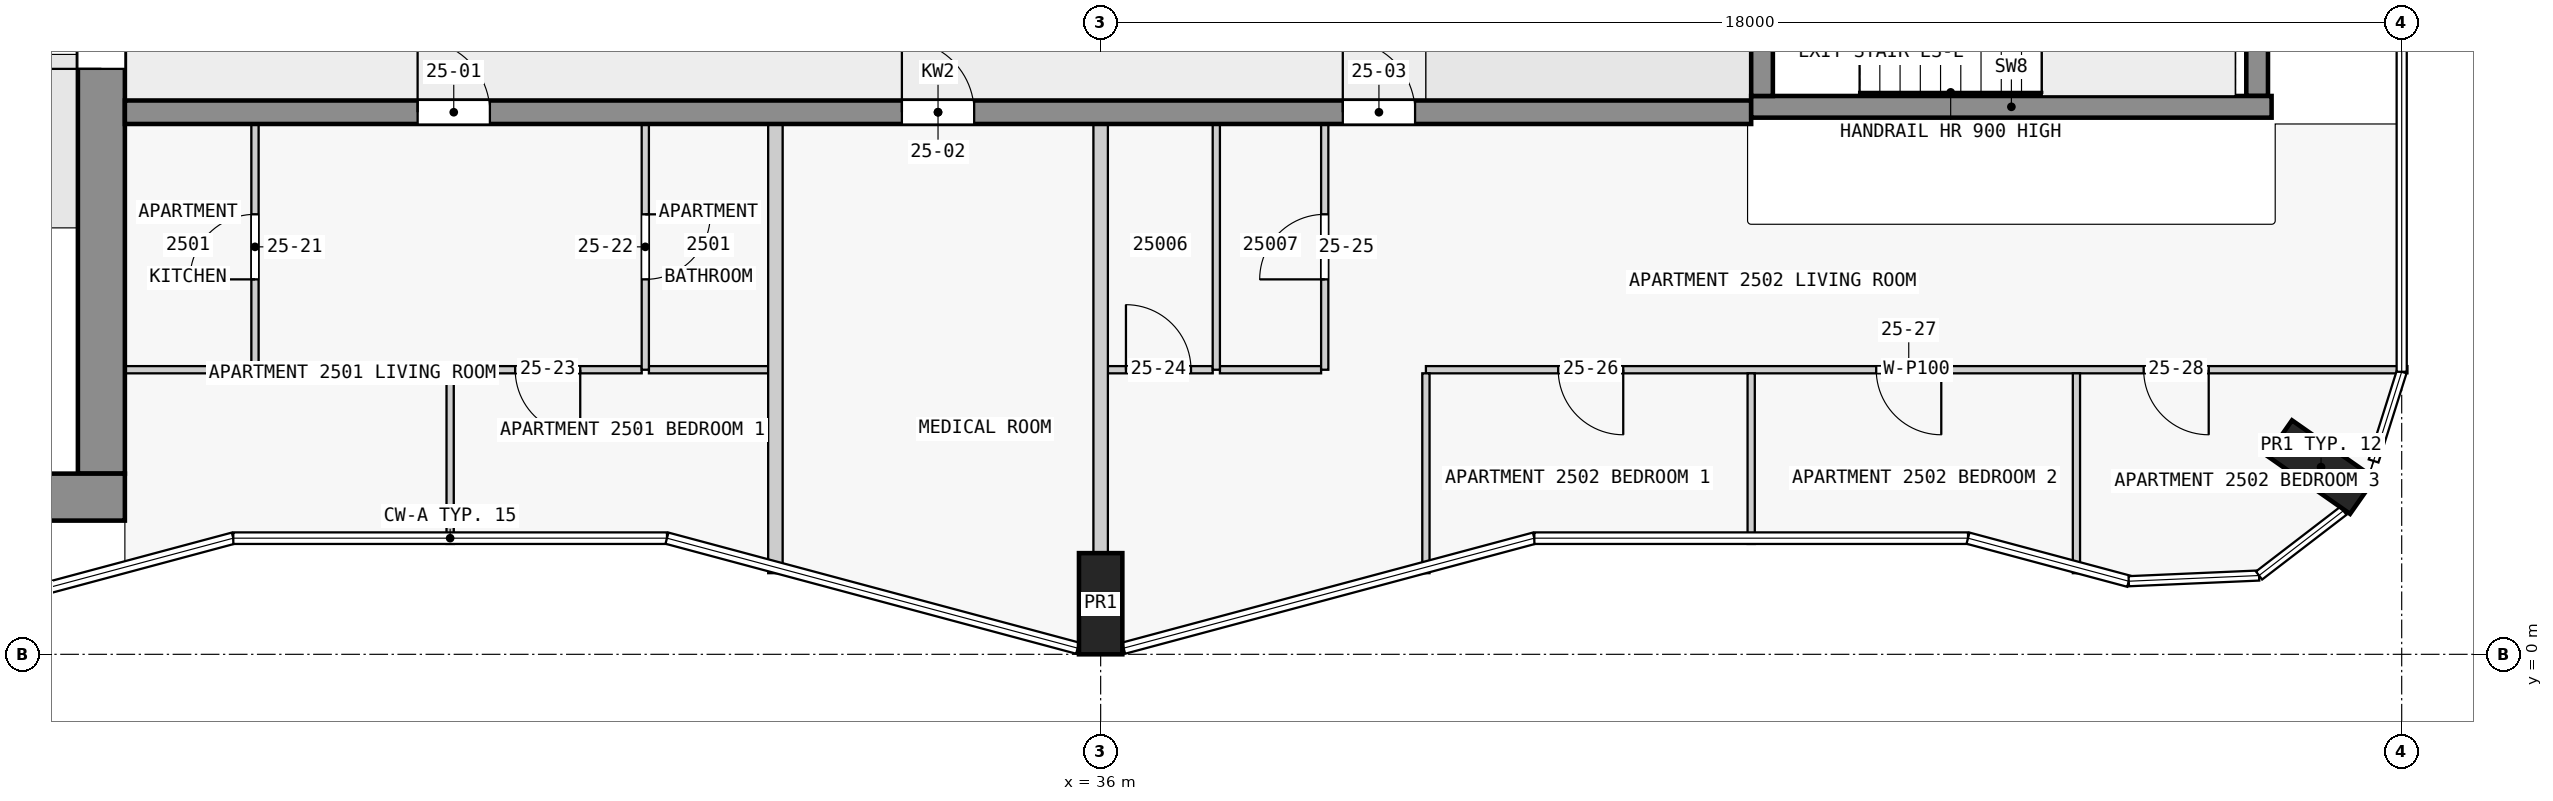
"""IFC4 building model, lengths in metres.
Left out: names, types, materials, properties, quantities, classifications, styles, units other than length and angle.
Written with IfcOpenShell. Run it as: python <this file> out.ifc"""

import sys

from ifc_helpers import new_model, si_unit, direction, frame, frame_2d, origin, origin_2d, place, context, subcontext, project, spatial, rectangle, extrude, element, fill, save


model = new_model("IFC4")
c1 = context("Model", 3, precision=1e-05, world=origin(), true_north=direction((0.0, 1.0)))
c2 = subcontext(c1, "Body", "Model", "MODEL_VIEW")
j1 = project(units=[si_unit("LENGTHUNIT", "METRE"), si_unit("PLANEANGLEUNIT", "RADIAN")], contexts=[c1])
p1 = place(None, origin())
s1 = spatial("IfcSite", under=j1, at=p1, CompositionType="ELEMENT")
p2 = place(p1, origin())
s2 = spatial("IfcBuilding", under=s1, at=p2, CompositionType="ELEMENT")
p3 = place(p2, frame((0.0, 0.0, 99.3)))
s3 = spatial("IfcBuildingStorey", under=s2, at=p3, CompositionType="ELEMENT", Elevation=99.3)
for number, where, z_axis, x_axis in (
    (1, (36.0, 0.7, 0.0), (0.0, 0.0, 1.0), (1.0, 0.0, 0.0)),
    (2, (52.884, 2.59, 0.0), (0.0, 0.0, 1.0), (0.574, 0.819, 0.0)),
):
    element("IfcColumn", number, at=place(p3, frame(where, z_axis=z_axis, x_axis=x_axis)), inside=s3, PredefinedType="COLUMN", context=c2, shape_type="SweptSolid", body=[
        extrude(rectangle(XDim=0.6, YDim=1.4, at=origin_2d()), origin(), (0.0, 0.0, 1.0), 3.5),
    ])
p4 = place(p3, frame((1.65, 2.175, 0.0), z_axis=(0.0, 0.0, 1.0), x_axis=(1.0, 0.0, 0.0)))
e3 = element("IfcWall", 3, at=p4, inside=s3, PredefinedType="SHEAR", context=c2, shape_type="SweptSolid", body=[
    extrude(rectangle(XDim=20.85, YDim=0.65, at=frame_2d((10.425, 0.0))), origin(), (0.0, 0.0, 1.0), 3.25),
])
p5 = place(p3, frame((22.175, 2.5, 0.0), z_axis=(0.0, 0.0, 1.0), x_axis=(0.0, 1.0, 0.0)))
e4 = element("IfcWall", 4, at=p5, inside=s3, PredefinedType="SHEAR", context=c2, shape_type="SweptSolid", body=[
    extrude(rectangle(XDim=14.85, YDim=0.65, at=frame_2d((7.425, 0.0))), origin(), (0.0, 0.0, 1.0), 3.25),
])
p6 = place(p5, frame((5.6, 0.0, 0.0)))
e5 = element("IfcOpeningElement", 5, at=p6, cuts=e4, PredefinedType="OPENING", context=c2, shape_type="SweptSolid", body=[
    extrude(rectangle(XDim=1.8, YDim=2.1, at=frame_2d((0.9, 1.05))), frame((0.0, 0.335, 0.0), z_axis=(0.0, -1.0, 0.0), x_axis=(1.0, 0.0, 0.0)), (0.0, 0.0, 1.0), 0.67),
])
p7 = place(p3, frame((45.15, 7.725, 0.0), z_axis=(0.0, 0.0, 1.0), x_axis=(0.0, 1.0, 0.0)))
e6 = element("IfcWall", 6, at=p7, inside=s3, PredefinedType="SHEAR", context=c2, shape_type="SweptSolid", body=[
    extrude(rectangle(XDim=2.55, YDim=0.3, at=frame_2d((1.275, 0.0))), origin(), (0.0, 0.0, 1.0), 3.5),
])
p8 = place(p7, frame((0.725, 0.0, 0.0)))
e7 = element("IfcOpeningElement", 7, at=p8, cuts=e6, PredefinedType="OPENING", context=c2, shape_type="SweptSolid", body=[
    extrude(rectangle(XDim=1.1, YDim=2.1, at=frame_2d((0.55, 1.05))), frame((0.0, 0.16, 0.0), z_axis=(0.0, -1.0, 0.0), x_axis=(1.0, 0.0, 0.0)), (0.0, 0.0, 1.0), 0.32),
])
p9 = place(p3, frame((52.0, 7.725, 0.0), z_axis=(0.0, 0.0, 1.0), x_axis=(0.0, 1.0, 0.0)))
e8 = element("IfcWall", 8, at=p9, inside=s3, PredefinedType="SHEAR", context=c2, shape_type="SweptSolid", body=[
    extrude(rectangle(XDim=2.55, YDim=0.3, at=frame_2d((1.275, 0.0))), origin(), (0.0, 0.0, 1.0), 3.5),
])
p10 = place(p3, frame((45.0, 7.575, 0.0), z_axis=(0.0, 0.0, 1.0), x_axis=(1.0, 0.0, 0.0)))
e9 = element("IfcWall", 9, at=p10, inside=s3, PredefinedType="SHEAR", context=c2, shape_type="SweptSolid", body=[
    extrude(rectangle(XDim=7.2, YDim=0.3, at=frame_2d((3.6, 0.0))), origin(), (0.0, 0.0, 1.0), 3.5),
])
p11 = place(p3, frame((22.5, 7.5, 0.0), z_axis=(0.0, 0.0, 1.0), x_axis=(1.0, 0.0, 0.0)))
e10 = element("IfcWall", 10, at=p11, inside=s3, PredefinedType="SHEAR", context=c2, shape_type="SweptSolid", body=[
    extrude(rectangle(XDim=22.5, YDim=0.325, at=frame_2d((11.25, 0.0))), origin(), (0.0, 0.0, 1.0), 3.25),
])
p12 = place(p11, frame((4.05, 0.0, 0.0)))
e11 = element("IfcOpeningElement", 11, at=p12, cuts=e10, PredefinedType="OPENING", context=c2, shape_type="SweptSolid", body=[
    extrude(rectangle(XDim=1.0, YDim=2.1, at=frame_2d((0.5, 1.05))), frame((0.0, 0.172, 0.0), z_axis=(0.0, -1.0, 0.0), x_axis=(1.0, 0.0, 0.0)), (0.0, 0.0, 1.0), 0.345),
])
p13 = place(p11, frame((10.75, 0.0, 0.0)))
e12 = element("IfcOpeningElement", 12, at=p13, cuts=e10, PredefinedType="OPENING", context=c2, shape_type="SweptSolid", body=[
    extrude(rectangle(XDim=1.0, YDim=2.1, at=frame_2d((0.5, 1.05))), frame((0.0, 0.172, 0.0), z_axis=(0.0, -1.0, 0.0), x_axis=(1.0, 0.0, 0.0)), (0.0, 0.0, 1.0), 0.345),
])
p14 = place(p11, frame((16.85, 0.0, 0.0)))
e13 = element("IfcOpeningElement", 13, at=p14, cuts=e10, PredefinedType="OPENING", context=c2, shape_type="SweptSolid", body=[
    extrude(rectangle(XDim=1.0, YDim=2.1, at=frame_2d((0.5, 1.05))), frame((0.0, 0.172, 0.0), z_axis=(0.0, -1.0, 0.0), x_axis=(1.0, 0.0, 0.0)), (0.0, 0.0, 1.0), 0.345),
])
p15 = place(p3, frame((29.65, 3.938, 0.0), z_axis=(0.0, 0.0, 1.0), x_axis=(-1.0, 0.0, 0.0)))
e14 = element("IfcWall", 14, at=p15, inside=s3, PredefinedType="PARTITIONING", context=c2, shape_type="SweptSolid", body=[
    extrude(rectangle(XDim=2.65, YDim=0.1, at=frame_2d((1.325, 0.0))), origin(), (0.0, 0.0, 1.0), 3.25),
])
p16 = place(p15, frame((0.85, 0.0, 0.0)))
e15 = element("IfcOpeningElement", 15, at=p16, cuts=e14, PredefinedType="OPENING", context=c2, shape_type="SweptSolid", body=[
    extrude(rectangle(XDim=0.9, YDim=2.1, at=frame_2d((0.45, 1.05))), frame((0.0, 0.06, 0.0), z_axis=(0.0, -1.0, 0.0), x_axis=(1.0, 0.0, 0.0)), (0.0, 0.0, 1.0), 0.12),
])
p17 = place(p3, frame((54.08, 3.938, 0.0), z_axis=(0.0, 0.0, 1.0), x_axis=(-1.0, 0.0, 0.0)))
e16 = element("IfcWall", 16, at=p17, inside=s3, PredefinedType="PARTITIONING", context=c2, shape_type="SweptSolid", body=[
    extrude(rectangle(XDim=13.58, YDim=0.1, at=frame_2d((6.79, 0.0))), origin(), (0.0, 0.0, 1.0), 3.25),
])
p18 = place(p17, frame((10.85, 0.0, 0.0)))
e17 = element("IfcOpeningElement", 17, at=p18, cuts=e16, PredefinedType="OPENING", context=c2, shape_type="SweptSolid", body=[
    extrude(rectangle(XDim=0.9, YDim=2.1, at=frame_2d((0.45, 1.05))), frame((0.0, 0.06, 0.0), z_axis=(0.0, -1.0, 0.0), x_axis=(1.0, 0.0, 0.0)), (0.0, 0.0, 1.0), 0.12),
])
p19 = place(p17, frame((6.45, 0.0, 0.0)))
e18 = element("IfcOpeningElement", 18, at=p19, cuts=e16, PredefinedType="OPENING", context=c2, shape_type="SweptSolid", body=[
    extrude(rectangle(XDim=0.9, YDim=2.1, at=frame_2d((0.45, 1.05))), frame((0.0, 0.06, 0.0), z_axis=(0.0, -1.0, 0.0), x_axis=(1.0, 0.0, 0.0)), (0.0, 0.0, 1.0), 0.12),
])
p20 = place(p17, frame((2.75, 0.0, 0.0)))
e19 = element("IfcOpeningElement", 19, at=p20, cuts=e16, PredefinedType="OPENING", context=c2, shape_type="SweptSolid", body=[
    extrude(rectangle(XDim=0.9, YDim=2.1, at=frame_2d((0.45, 1.05))), frame((0.0, 0.06, 0.0), z_axis=(0.0, -1.0, 0.0), x_axis=(1.0, 0.0, 0.0)), (0.0, 0.0, 1.0), 0.12),
])
p21 = place(p3, frame((22.5, 3.938, 0.0), z_axis=(0.0, 0.0, 1.0), x_axis=(1.0, 0.0, 0.0)))
e20 = element("IfcWall", 20, at=p21, inside=s3, PredefinedType="PARTITIONING", context=c2, shape_type="SweptSolid", body=[
    extrude(rectangle(XDim=1.75, YDim=0.1, at=frame_2d((0.875, 0.0))), origin(), (0.0, 0.0, 1.0), 3.25),
])
p22 = place(p3, frame((29.75, 3.938, 0.0), z_axis=(0.0, 0.0, 1.0), x_axis=(1.0, 0.0, 0.0)))
e21 = element("IfcWall", 21, at=p22, inside=s3, PredefinedType="PARTITIONING", context=c2, shape_type="SweptSolid", body=[
    extrude(rectangle(XDim=1.65, YDim=0.1, at=frame_2d((0.825, 0.0))), origin(), (0.0, 0.0, 1.0), 3.25),
])
p23 = place(p3, frame((36.1, 3.938, 0.0), z_axis=(0.0, 0.0, 1.0), x_axis=(1.0, 0.0, 0.0)))
e22 = element("IfcWall", 22, at=p23, inside=s3, PredefinedType="PARTITIONING", context=c2, shape_type="SweptSolid", body=[
    extrude(rectangle(XDim=1.45, YDim=0.1, at=frame_2d((0.725, 0.0))), origin(), (0.0, 0.0, 1.0), 3.25),
])
p24 = place(p23, frame((0.25, 0.0, 0.0)))
e23 = element("IfcOpeningElement", 23, at=p24, cuts=e22, PredefinedType="OPENING", context=c2, shape_type="SweptSolid", body=[
    extrude(rectangle(XDim=0.9, YDim=2.1, at=frame_2d((0.45, 1.05))), frame((0.0, 0.06, 0.0), z_axis=(0.0, -1.0, 0.0), x_axis=(1.0, 0.0, 0.0)), (0.0, 0.0, 1.0), 0.12),
])
p25 = place(p3, frame((37.65, 3.938, 0.0), z_axis=(0.0, 0.0, 1.0), x_axis=(1.0, 0.0, 0.0)))
e24 = element("IfcWall", 24, at=p25, inside=s3, PredefinedType="PARTITIONING", context=c2, shape_type="SweptSolid", body=[
    extrude(rectangle(XDim=1.4, YDim=0.1, at=frame_2d((0.7, 0.0))), origin(), (0.0, 0.0, 1.0), 3.25),
])
p26 = place(p3, frame((24.3, 3.938, 0.0), z_axis=(0.0, 0.0, 1.0), x_axis=(0.0, 1.0, 0.0)))
e25 = element("IfcWall", 25, at=p26, inside=s3, PredefinedType="PARTITIONING", context=c2, shape_type="SweptSolid", body=[
    extrude(rectangle(XDim=3.4, YDim=0.1, at=frame_2d((1.7, 0.0))), origin(), (0.0, 0.0, 1.0), 3.25),
])
p27 = place(p26, frame((1.25, 0.0, 0.0)))
e26 = element("IfcOpeningElement", 26, at=p27, cuts=e25, PredefinedType="OPENING", context=c2, shape_type="SweptSolid", body=[
    extrude(rectangle(XDim=0.9, YDim=2.1, at=frame_2d((0.45, 1.05))), frame((0.0, 0.06, 0.0), z_axis=(0.0, -1.0, 0.0), x_axis=(1.0, 0.0, 0.0)), (0.0, 0.0, 1.0), 0.12),
])
p28 = place(p3, frame((27.0, 3.887, 0.0), z_axis=(0.0, 0.0, 1.0), x_axis=(0.0, -1.0, 0.0)))
e27 = element("IfcWall", 27, at=p28, inside=s3, PredefinedType="PARTITIONING", context=c2, shape_type="SweptSolid", body=[
    extrude(rectangle(XDim=2.361, YDim=0.1, at=frame_2d((1.18, 0.0))), origin(), (0.0, 0.0, 1.0), 3.25),
])
p29 = place(p3, frame((29.7, 7.337, 0.0), z_axis=(0.0, 0.0, 1.0), x_axis=(0.0, -1.0, 0.0)))
e28 = element("IfcWall", 28, at=p29, inside=s3, PredefinedType="PARTITIONING", context=c2, shape_type="SweptSolid", body=[
    extrude(rectangle(XDim=3.4, YDim=0.1, at=frame_2d((1.7, 0.0))), origin(), (0.0, 0.0, 1.0), 3.25),
])
p30 = place(p29, frame((1.25, 0.0, 0.0)))
e29 = element("IfcOpeningElement", 29, at=p30, cuts=e28, PredefinedType="OPENING", context=c2, shape_type="SweptSolid", body=[
    extrude(rectangle(XDim=0.9, YDim=2.1, at=frame_2d((0.45, 1.05))), frame((0.0, 0.06, 0.0), z_axis=(0.0, -1.0, 0.0), x_axis=(1.0, 0.0, 0.0)), (0.0, 0.0, 1.0), 0.12),
])
p31 = place(p3, frame((31.5, 1.122, 0.0), z_axis=(0.0, 0.0, 1.0), x_axis=(0.0, 1.0, 0.0)))
e30 = element("IfcWall", 30, at=p31, inside=s3, PredefinedType="PARTITIONING", context=c2, shape_type="SweptSolid", body=[
    extrude(rectangle(XDim=6.215, YDim=0.2, at=frame_2d((3.107, 0.0))), origin(), (0.0, 0.0, 1.0), 3.25),
])
p32 = place(p3, frame((36.0, 1.4, 0.0), z_axis=(0.0, 0.0, 1.0), x_axis=(0.0, 1.0, 0.0)))
e31 = element("IfcWall", 31, at=p32, inside=s3, PredefinedType="PARTITIONING", context=c2, shape_type="SweptSolid", body=[
    extrude(rectangle(XDim=5.938, YDim=0.2, at=frame_2d((2.969, 0.0))), origin(), (0.0, 0.0, 1.0), 3.25),
])
p33 = place(p3, frame((37.6, 3.938, 0.0), z_axis=(0.0, 0.0, 1.0), x_axis=(0.0, 1.0, 0.0)))
e32 = element("IfcWall", 32, at=p33, inside=s3, PredefinedType="PARTITIONING", context=c2, shape_type="SweptSolid", body=[
    extrude(rectangle(XDim=3.4, YDim=0.1, at=frame_2d((1.7, 0.0))), origin(), (0.0, 0.0, 1.0), 3.25),
])
p34 = place(p3, frame((39.1, 3.938, 0.0), z_axis=(0.0, 0.0, 1.0), x_axis=(0.0, 1.0, 0.0)))
e33 = element("IfcWall", 33, at=p34, inside=s3, PredefinedType="PARTITIONING", context=c2, shape_type="SweptSolid", body=[
    extrude(rectangle(XDim=3.4, YDim=0.1, at=frame_2d((1.7, 0.0))), origin(), (0.0, 0.0, 1.0), 3.25),
])
p35 = place(p34, frame((1.25, 0.0, 0.0)))
e34 = element("IfcOpeningElement", 34, at=p35, cuts=e33, PredefinedType="OPENING", context=c2, shape_type="SweptSolid", body=[
    extrude(rectangle(XDim=0.9, YDim=2.1, at=frame_2d((0.45, 1.05))), frame((0.0, 0.06, 0.0), z_axis=(0.0, -1.0, 0.0), x_axis=(1.0, 0.0, 0.0)), (0.0, 0.0, 1.0), 0.12),
])
p36 = place(p3, frame((40.5, 3.887, 0.0), z_axis=(0.0, 0.0, 1.0), x_axis=(0.0, -1.0, 0.0)))
e35 = element("IfcWall", 35, at=p36, inside=s3, PredefinedType="PARTITIONING", context=c2, shape_type="SweptSolid", body=[
    extrude(rectangle(XDim=2.765, YDim=0.1, at=frame_2d((1.383, 0.0))), origin(), (0.0, 0.0, 1.0), 3.25),
])
p37 = place(p3, frame((45.0, 1.527, 0.0), z_axis=(0.0, 0.0, 1.0), x_axis=(0.0, 1.0, 0.0)))
e36 = element("IfcWall", 36, at=p37, inside=s3, PredefinedType="PARTITIONING", context=c2, shape_type="SweptSolid", body=[
    extrude(rectangle(XDim=2.361, YDim=0.1, at=frame_2d((1.18, 0.0))), origin(), (0.0, 0.0, 1.0), 3.25),
])
p38 = place(p3, frame((49.5, 1.122, 0.0), z_axis=(0.0, 0.0, 1.0), x_axis=(0.0, 1.0, 0.0)))
e37 = element("IfcWall", 37, at=p38, inside=s3, PredefinedType="PARTITIONING", context=c2, shape_type="SweptSolid", body=[
    extrude(rectangle(XDim=2.765, YDim=0.1, at=frame_2d((1.383, 0.0))), origin(), (0.0, 0.0, 1.0), 3.25),
])
p39 = place(p6, origin())
e38 = element("IfcDoor", 38, at=p39, inside=s3, OperationType="DOUBLE_DOOR_SINGLE_SWING", PredefinedType="DOOR", context=c2, shape_type="SweptSolid", body=[
    extrude(rectangle(XDim=1.8, YDim=2.1, at=frame_2d((0.9, 1.05))), frame((0.0, 0.025, 0.0), z_axis=(0.0, -1.0, 0.0), x_axis=(1.0, 0.0, 0.0)), (0.0, 0.0, 1.0), 0.05),
])
fill(e5, e38)
p40 = place(p12, origin())
e39 = element("IfcDoor", 39, at=p40, inside=s3, OperationType="SINGLE_SWING_LEFT", PredefinedType="DOOR", context=c2, shape_type="SweptSolid", body=[
    extrude(rectangle(XDim=1.0, YDim=2.1, at=frame_2d((0.5, 1.05))), frame((0.0, 0.025, 0.0), z_axis=(0.0, -1.0, 0.0), x_axis=(1.0, 0.0, 0.0)), (0.0, 0.0, 1.0), 0.05),
])
fill(e11, e39)
p41 = place(p13, origin())
e40 = element("IfcDoor", 40, at=p41, inside=s3, OperationType="SINGLE_SWING_LEFT", PredefinedType="DOOR", context=c2, shape_type="SweptSolid", body=[
    extrude(rectangle(XDim=1.0, YDim=2.1, at=frame_2d((0.5, 1.05))), frame((0.0, 0.025, 0.0), z_axis=(0.0, -1.0, 0.0), x_axis=(1.0, 0.0, 0.0)), (0.0, 0.0, 1.0), 0.05),
])
fill(e12, e40)
p42 = place(p14, origin())
e41 = element("IfcDoor", 41, at=p42, inside=s3, OperationType="SINGLE_SWING_RIGHT", PredefinedType="DOOR", context=c2, shape_type="SweptSolid", body=[
    extrude(rectangle(XDim=1.0, YDim=2.1, at=frame_2d((0.5, 1.05))), frame((0.0, 0.025, 0.0), z_axis=(0.0, -1.0, 0.0), x_axis=(1.0, 0.0, 0.0)), (0.0, 0.0, 1.0), 0.05),
])
fill(e13, e41)
p43 = place(p27, origin())
e42 = element("IfcDoor", 42, at=p43, inside=s3, OperationType="SINGLE_SWING_LEFT", PredefinedType="DOOR", context=c2, shape_type="SweptSolid", body=[
    extrude(rectangle(XDim=0.9, YDim=2.1, at=frame_2d((0.45, 1.05))), frame((0.0, 0.025, 0.0), z_axis=(0.0, -1.0, 0.0), x_axis=(1.0, 0.0, 0.0)), (0.0, 0.0, 1.0), 0.05),
])
fill(e26, e42)
p44 = place(p30, origin())
e43 = element("IfcDoor", 43, at=p44, inside=s3, OperationType="SINGLE_SWING_LEFT", PredefinedType="DOOR", context=c2, shape_type="SweptSolid", body=[
    extrude(rectangle(XDim=0.9, YDim=2.1, at=frame_2d((0.45, 1.05))), frame((0.0, 0.025, 0.0), z_axis=(0.0, -1.0, 0.0), x_axis=(1.0, 0.0, 0.0)), (0.0, 0.0, 1.0), 0.05),
])
fill(e29, e43)
p45 = place(p16, origin())
e44 = element("IfcDoor", 44, at=p45, inside=s3, OperationType="SINGLE_SWING_LEFT", PredefinedType="DOOR", context=c2, shape_type="SweptSolid", body=[
    extrude(rectangle(XDim=0.9, YDim=2.1, at=frame_2d((0.45, 1.05))), frame((0.0, 0.025, 0.0), z_axis=(0.0, -1.0, 0.0), x_axis=(1.0, 0.0, 0.0)), (0.0, 0.0, 1.0), 0.05),
])
fill(e15, e44)
p46 = place(p24, origin())
e45 = element("IfcDoor", 45, at=p46, inside=s3, OperationType="SINGLE_SWING_LEFT", PredefinedType="DOOR", context=c2, shape_type="SweptSolid", body=[
    extrude(rectangle(XDim=0.9, YDim=2.1, at=frame_2d((0.45, 1.05))), frame((0.0, 0.025, 0.0), z_axis=(0.0, -1.0, 0.0), x_axis=(1.0, 0.0, 0.0)), (0.0, 0.0, 1.0), 0.05),
])
fill(e23, e45)
p47 = place(p35, origin())
e46 = element("IfcDoor", 46, at=p47, inside=s3, OperationType="SINGLE_SWING_LEFT", PredefinedType="DOOR", context=c2, shape_type="SweptSolid", body=[
    extrude(rectangle(XDim=0.9, YDim=2.1, at=frame_2d((0.45, 1.05))), frame((0.0, 0.025, 0.0), z_axis=(0.0, -1.0, 0.0), x_axis=(1.0, 0.0, 0.0)), (0.0, 0.0, 1.0), 0.05),
])
fill(e34, e46)
p48 = place(p18, origin())
e47 = element("IfcDoor", 47, at=p48, inside=s3, OperationType="SINGLE_SWING_RIGHT", PredefinedType="DOOR", context=c2, shape_type="SweptSolid", body=[
    extrude(rectangle(XDim=0.9, YDim=2.1, at=frame_2d((0.45, 1.05))), frame((0.0, 0.025, 0.0), z_axis=(0.0, -1.0, 0.0), x_axis=(1.0, 0.0, 0.0)), (0.0, 0.0, 1.0), 0.05),
])
fill(e17, e47)
p49 = place(p19, origin())
e48 = element("IfcDoor", 48, at=p49, inside=s3, OperationType="SINGLE_SWING_RIGHT", PredefinedType="DOOR", context=c2, shape_type="SweptSolid", body=[
    extrude(rectangle(XDim=0.9, YDim=2.1, at=frame_2d((0.45, 1.05))), frame((0.0, 0.025, 0.0), z_axis=(0.0, -1.0, 0.0), x_axis=(1.0, 0.0, 0.0)), (0.0, 0.0, 1.0), 0.05),
])
fill(e18, e48)
p50 = place(p20, origin())
e49 = element("IfcDoor", 49, at=p50, inside=s3, OperationType="SINGLE_SWING_LEFT", PredefinedType="DOOR", context=c2, shape_type="SweptSolid", body=[
    extrude(rectangle(XDim=0.9, YDim=2.1, at=frame_2d((0.45, 1.05))), frame((0.0, 0.025, 0.0), z_axis=(0.0, -1.0, 0.0), x_axis=(1.0, 0.0, 0.0)), (0.0, 0.0, 1.0), 0.05),
])
fill(e19, e49)
save(model, sys.argv[1])
